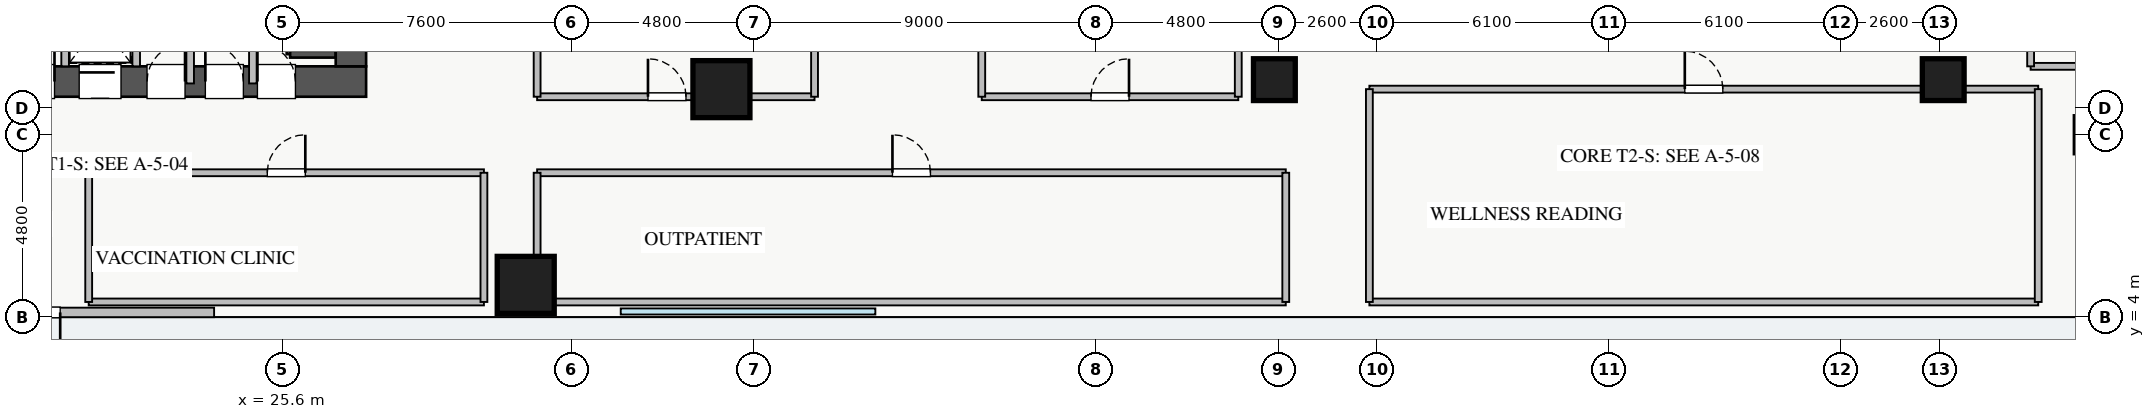
"""IFC4 building model, lengths in metres.
Left out: names, types, materials, properties, quantities, classifications, styles, units other than length and angle.
Written with IfcOpenShell. Run it as: python <this file> out.ifc"""

import sys

from ifc_helpers import new_model, si_unit, direction, frame, frame_2d, origin, origin_2d, place, context, subcontext, project, spatial, rectangle, extrude, source, transform, mapped, element, fill, save


model = new_model("IFC4")
c1 = context("Model", 3, precision=1e-05, world=origin(), true_north=direction((0.0, 1.0)))
c2 = subcontext(c1, "Body", "Model", "MODEL_VIEW")
j1 = project(units=[si_unit("LENGTHUNIT", "METRE"), si_unit("PLANEANGLEUNIT", "RADIAN")], contexts=[c1])
p1 = place(None, origin())
s1 = spatial("IfcSite", under=j1, at=p1, CompositionType="ELEMENT")
p2 = place(p1, origin())
s2 = spatial("IfcBuilding", under=s1, at=p2, CompositionType="ELEMENT")
p3 = place(p2, frame((0.0, 0.0, 9.4)))
s3 = spatial("IfcBuildingStorey", under=s2, at=p3, CompositionType="ELEMENT", Elevation=9.4)
p4 = place(p3, frame((25.8, 10.92, 0.0), z_axis=(0.0, 0.0, 1.0), x_axis=(0.0, 1.0, 0.0)))
e1 = element("IfcWall", 1, at=p4, inside=s3, PredefinedType="SHEAR", context=c2, shape_type="SweptSolid", body=[
    extrude(rectangle(XDim=1.06, YDim=0.18, at=frame_2d((0.53, 0.0))), origin(), (0.0, 0.0, 1.0), 4.18),
])
p5 = place(p3, frame((25.8, 10.92, 0.0), z_axis=(0.0, 0.0, 1.0), x_axis=(1.0, 0.0, 0.0)))
e2 = element("IfcWall", 2, at=p5, inside=s3, PredefinedType="SHEAR", context=c2, shape_type="SweptSolid", body=[
    extrude(rectangle(XDim=1.2, YDim=0.18, at=frame_2d((0.6, 0.0))), origin(), (0.0, 0.0, 1.0), 4.18),
])
p6 = place(p3, frame((10.2, 10.2, 0.0), z_axis=(0.0, 0.0, 1.0), x_axis=(1.0, 0.0, 0.0)))
e3 = element("IfcWall", 3, at=p6, inside=s3, PredefinedType="SHEAR", context=c2, shape_type="SweptSolid", body=[
    extrude(rectangle(XDim=17.6, YDim=0.8, at=frame_2d((8.8, 0.0))), origin(), (0.0, 0.0, 1.0), 4.4),
])
p7 = place(p6, frame((1.15, 0.0, 0.0)))
e4 = element("IfcOpeningElement", 4, at=p7, cuts=e3, PredefinedType="OPENING", context=c2, shape_type="SweptSolid", body=[
    extrude(rectangle(XDim=1.1, YDim=2.05, at=frame_2d((0.55, 1.025))), frame((0.0, 0.41, 0.0), z_axis=(0.0, -1.0, 0.0), x_axis=(1.0, 0.0, 0.0)), (0.0, 0.0, 1.0), 0.82),
])
p8 = place(p6, frame((8.3, 0.0, 0.0)))
e5 = element("IfcOpeningElement", 5, at=p8, cuts=e3, PredefinedType="OPENING", context=c2, shape_type="SweptSolid", body=[
    extrude(rectangle(XDim=1.1, YDim=2.05, at=frame_2d((0.55, 1.025))), frame((0.0, 0.41, 0.0), z_axis=(0.0, -1.0, 0.0), x_axis=(1.0, 0.0, 0.0)), (0.0, 0.0, 1.0), 0.82),
])
p9 = place(p6, frame((10.05, 0.0, 0.0)))
e6 = element("IfcOpeningElement", 6, at=p9, cuts=e3, PredefinedType="OPENING", context=c2, shape_type="SweptSolid", body=[
    extrude(rectangle(XDim=1.1, YDim=2.05, at=frame_2d((0.55, 1.025))), frame((0.0, 0.41, 0.0), z_axis=(0.0, -1.0, 0.0), x_axis=(1.0, 0.0, 0.0)), (0.0, 0.0, 1.0), 0.82),
])
p10 = place(p6, frame((14.74, 0.0, 0.0)))
e7 = element("IfcOpeningElement", 7, at=p10, cuts=e3, PredefinedType="OPENING", context=c2, shape_type="SweptSolid", body=[
    extrude(rectangle(XDim=1.0, YDim=2.05, at=frame_2d((0.5, 1.025))), frame((0.0, 0.41, 0.0), z_axis=(0.0, -1.0, 0.0), x_axis=(1.0, 0.0, 0.0)), (0.0, 0.0, 1.0), 0.82),
])
p11 = place(p6, frame((11.835, 0.0, 0.0)))
e8 = element("IfcOpeningElement", 8, at=p11, cuts=e3, PredefinedType="OPENING", context=c2, shape_type="SweptSolid", body=[
    extrude(rectangle(XDim=1.0, YDim=2.05, at=frame_2d((0.5, 1.025))), frame((0.0, 0.41, 0.0), z_axis=(0.0, -1.0, 0.0), x_axis=(1.0, 0.0, 0.0)), (0.0, 0.0, 1.0), 0.82),
])
p12 = place(p6, frame((13.37, 0.0, 0.0)))
e9 = element("IfcOpeningElement", 9, at=p12, cuts=e3, PredefinedType="OPENING", context=c2, shape_type="SweptSolid", body=[
    extrude(rectangle(XDim=1.0, YDim=2.05, at=frame_2d((0.5, 1.025))), frame((0.0, 0.41, 0.0), z_axis=(0.0, -1.0, 0.0), x_axis=(1.0, 0.0, 0.0)), (0.0, 0.0, 1.0), 0.82),
])
p13 = place(p3, frame((27.4, 10.6, 0.0), z_axis=(0.0, 0.0, 1.0), x_axis=(0.0, 1.0, 0.0)))
e10 = element("IfcWall", 10, at=p13, inside=s3, PredefinedType="SHEAR", context=c2, shape_type="SweptSolid", body=[
    extrude(rectangle(XDim=5.6, YDim=0.8, at=frame_2d((2.8, 0.0))), origin(), (0.0, 0.0, 1.0), 4.4),
])
p14 = place(p13, frame((2.1, 0.0, 0.0)))
e11 = element("IfcOpeningElement", 11, at=p14, cuts=e10, PredefinedType="OPENING", context=c2, shape_type="SweptSolid", body=[
    extrude(rectangle(XDim=1.3, YDim=2.05, at=frame_2d((0.65, 1.025))), frame((0.0, 0.41, 0.0), z_axis=(0.0, -1.0, 0.0), x_axis=(1.0, 0.0, 0.0)), (0.0, 0.0, 1.0), 0.82),
])
m1 = source(origin(), c2, "Body", "SweptSolid", [
    extrude(rectangle(XDim=1.5, YDim=1.5, at=origin_2d()), origin(), (0.0, 0.0, 1.0), 4.4),
])
for number, where, z_axis, x_axis in (
    (12, (32.0, 4.85, 0.0), (0.0, 0.0, 1.0), (1.0, 0.0, 0.0)),
    (13, (37.15, 10.0, 0.0), (0.0, 0.0, 1.0), (1.0, 0.0, 0.0)),
):
    element("IfcColumn", number, at=place(p3, frame(where, z_axis=z_axis, x_axis=x_axis)), inside=s3, PredefinedType="COLUMN", context=c2, shape_type="MappedRepresentation", body=[
        mapped(m1, transform((0.0, 0.0, 0.0), x_axis=(1.0, 0.0, 0.0), y_axis=(0.0, 1.0, 0.0), z_axis=(0.0, 0.0, 1.0), scale=1.0)),
    ])
m2 = source(origin(), c2, "Body", "SweptSolid", [
    extrude(rectangle(XDim=1.1, YDim=1.1, at=origin_2d()), origin(), (0.0, 0.0, 1.0), 4.4),
])
for number, where, z_axis, x_axis in (
    (14, (51.7, 10.25, 0.0), (0.0, 0.0, 1.0), (1.0, 0.0, 0.0)),
    (15, (69.3, 10.25, 0.0), (0.0, 0.0, 1.0), (1.0, 0.0, 0.0)),
):
    element("IfcColumn", number, at=place(p3, frame(where, z_axis=z_axis, x_axis=x_axis)), inside=s3, PredefinedType="COLUMN", context=c2, shape_type="MappedRepresentation", body=[
        mapped(m2, transform((0.0, 0.0, 0.0), x_axis=(1.0, 0.0, 0.0), y_axis=(0.0, 1.0, 0.0), z_axis=(0.0, 0.0, 1.0), scale=1.0)),
    ])
p15 = place(p3, frame((14.2, 4.125, 0.0), z_axis=(0.0, 0.0, 1.0), x_axis=(1.0, 0.0, 0.0)))
e16 = element("IfcWall", 16, at=p15, inside=s3, PredefinedType="STANDARD", context=c2, shape_type="SweptSolid", body=[
    extrude(rectangle(XDim=9.6, YDim=0.25, at=frame_2d((4.8, 0.0))), origin(), (0.0, 0.0, 1.0), 3.72),
])
p16 = place(p15, frame((4.05, 0.0, 0.0)))
e17 = element("IfcOpeningElement", 17, at=p16, cuts=e16, PredefinedType="OPENING", context=c2, shape_type="SweptSolid", body=[
    extrude(rectangle(XDim=1.5, YDim=2.15, at=frame_2d((0.75, 1.075))), frame((0.0, 0.135, 0.0), z_axis=(0.0, -1.0, 0.0), x_axis=(1.0, 0.0, 0.0)), (0.0, 0.0, 1.0), 0.27),
])
p17 = place(p3, frame((19.88, 10.6, 0.0), z_axis=(0.0, 0.0, 1.0), x_axis=(0.0, 1.0, 0.0)))
e18 = element("IfcWall", 18, at=p17, inside=s3, PredefinedType="PARTITIONING", context=c2, shape_type="SweptSolid", body=[
    extrude(rectangle(XDim=2.21, YDim=0.2, at=frame_2d((1.105, 0.0))), origin(), (0.0, 0.0, 1.0), 4.18),
])
p18 = place(p3, frame((24.82, 10.15, 0.0), z_axis=(0.0, 0.0, 1.0), x_axis=(0.0, 1.0, 0.0)))
e19 = element("IfcWall", 19, at=p18, inside=s3, PredefinedType="PARTITIONING", context=c2, shape_type="SweptSolid", body=[
    extrude(rectangle(XDim=2.65, YDim=0.2, at=frame_2d((1.325, 0.0))), origin(), (0.0, 0.0, 1.0), 4.18),
])
p19 = place(p3, frame((21.75, 10.6, 0.0), z_axis=(0.0, 0.0, 1.0), x_axis=(0.0, 1.0, 0.0)))
e20 = element("IfcWall", 20, at=p19, inside=s3, PredefinedType="PARTITIONING", context=c2, shape_type="SweptSolid", body=[
    extrude(rectangle(XDim=2.2, YDim=0.2, at=frame_2d((1.1, 0.0))), origin(), (0.0, 0.0, 1.0), 4.18),
])
p20 = place(p3, frame((23.17, 10.15, 0.0), z_axis=(0.0, 0.0, 1.0), x_axis=(0.0, 1.0, 0.0)))
e21 = element("IfcWall", 21, at=p20, inside=s3, PredefinedType="PARTITIONING", context=c2, shape_type="SweptSolid", body=[
    extrude(rectangle(XDim=2.65, YDim=0.2, at=frame_2d((1.325, 0.0))), origin(), (0.0, 0.0, 1.0), 4.18),
])
p21 = place(p3, frame((32.3, 9.8, 0.0), z_axis=(0.0, 0.0, 1.0), x_axis=(1.0, 0.0, 0.0)))
e22 = element("IfcWall", 22, at=p21, inside=s3, PredefinedType="PARTITIONING", context=c2, shape_type="SweptSolid", body=[
    extrude(rectangle(XDim=7.3, YDim=0.18, at=frame_2d((3.65, 0.0))), origin(), (0.0, 0.0, 1.0), 4.18),
])
p22 = place(p21, frame((2.917, 0.0, 0.0)))
e23 = element("IfcOpeningElement", 23, at=p22, cuts=e22, PredefinedType="OPENING", context=c2, shape_type="SweptSolid", body=[
    extrude(rectangle(XDim=1.0, YDim=2.05, at=frame_2d((0.5, 1.025))), frame((0.0, 0.1, 0.0), z_axis=(0.0, -1.0, 0.0), x_axis=(1.0, 0.0, 0.0)), (0.0, 0.0, 1.0), 0.2),
])
for number, where, z_axis, x_axis in (
    (24, (32.3, 9.8, 0.0), (0.0, 0.0, 1.0), (0.0, 1.0, 0.0)),
    (25, (39.6, 9.8, 0.0), (0.0, 0.0, 1.0), (0.0, 1.0, 0.0)),
):
    element("IfcWall", number, at=place(p3, frame(where, z_axis=z_axis, x_axis=x_axis)), inside=s3, PredefinedType="PARTITIONING", context=c2, shape_type="SweptSolid", body=[
        extrude(rectangle(XDim=2.8, YDim=0.18, at=frame_2d((1.4, 0.0))), origin(), (0.0, 0.0, 1.0), 4.18),
    ])
p23 = place(p3, frame((44.0, 9.8, 0.0), z_axis=(0.0, 0.0, 1.0), x_axis=(1.0, 0.0, 0.0)))
e26 = element("IfcWall", 26, at=p23, inside=s3, PredefinedType="PARTITIONING", context=c2, shape_type="SweptSolid", body=[
    extrude(rectangle(XDim=6.75, YDim=0.18, at=frame_2d((3.375, 0.0))), origin(), (0.0, 0.0, 1.0), 4.18),
])
p24 = place(p23, frame((2.875, 0.0, 0.0)))
e27 = element("IfcOpeningElement", 27, at=p24, cuts=e26, PredefinedType="OPENING", context=c2, shape_type="SweptSolid", body=[
    extrude(rectangle(XDim=1.0, YDim=2.05, at=frame_2d((0.5, 1.025))), frame((0.0, 0.1, 0.0), z_axis=(0.0, -1.0, 0.0), x_axis=(1.0, 0.0, 0.0)), (0.0, 0.0, 1.0), 0.2),
])
for number, where, z_axis, x_axis in (
    (28, (44.0, 9.8, 0.0), (0.0, 0.0, 1.0), (0.0, 1.0, 0.0)),
    (29, (50.75, 9.8, 0.0), (0.0, 0.0, 1.0), (0.0, 1.0, 0.0)),
):
    element("IfcWall", number, at=place(p3, frame(where, z_axis=z_axis, x_axis=x_axis)), inside=s3, PredefinedType="PARTITIONING", context=c2, shape_type="SweptSolid", body=[
        extrude(rectangle(XDim=12.0, YDim=0.18, at=frame_2d((6.0, 0.0))), origin(), (0.0, 0.0, 1.0), 4.18),
    ])
p25 = place(p3, frame((71.6, 10.6, 0.0), z_axis=(0.0, 0.0, 1.0), x_axis=(1.0, 0.0, 0.0)))
e30 = element("IfcWall", 30, at=p25, inside=s3, PredefinedType="PARTITIONING", context=c2, shape_type="SweptSolid", body=[
    extrude(rectangle(XDim=2.15, YDim=0.18, at=frame_2d((1.075, 0.0))), origin(), (0.0, 0.0, 1.0), 4.18),
])
p26 = place(p3, frame((71.6, 10.6, 0.0), z_axis=(0.0, 0.0, 1.0), x_axis=(0.0, 1.0, 0.0)))
e31 = element("IfcWall", 31, at=p26, inside=s3, PredefinedType="PARTITIONING", context=c2, shape_type="SweptSolid", body=[
    extrude(rectangle(XDim=24.8, YDim=0.18, at=frame_2d((12.4, 0.0))), origin(), (0.0, 0.0, 1.0), 4.18),
])
p27 = place(p26, frame((11.9, 0.0, 0.0)))
e32 = element("IfcOpeningElement", 32, at=p27, cuts=e31, PredefinedType="OPENING", context=c2, shape_type="SweptSolid", body=[
    extrude(rectangle(XDim=1.0, YDim=2.05, at=frame_2d((0.5, 1.025))), frame((0.0, 0.1, 0.0), z_axis=(0.0, -1.0, 0.0), x_axis=(1.0, 0.0, 0.0)), (0.0, 0.0, 1.0), 0.2),
])
p28 = place(p3, frame((20.5, 4.4, 0.0), z_axis=(0.0, 0.0, 1.0), x_axis=(1.0, 0.0, 0.0)))
e33 = element("IfcWall", 33, at=p28, inside=s3, PredefinedType="PARTITIONING", context=c2, shape_type="SweptSolid", body=[
    extrude(rectangle(XDim=10.4, YDim=0.18, at=frame_2d((5.2, 0.0))), origin(), (0.0, 0.0, 1.0), 4.18),
])
p29 = place(p3, frame((20.5, 7.8, 0.0), z_axis=(0.0, 0.0, 1.0), x_axis=(1.0, 0.0, 0.0)))
e34 = element("IfcWall", 34, at=p29, inside=s3, PredefinedType="PARTITIONING", context=c2, shape_type="SweptSolid", body=[
    extrude(rectangle(XDim=10.4, YDim=0.18, at=frame_2d((5.2, 0.0))), origin(), (0.0, 0.0, 1.0), 4.18),
])
p30 = place(p29, frame((4.7, 0.0, 0.0)))
e35 = element("IfcOpeningElement", 35, at=p30, cuts=e34, PredefinedType="OPENING", context=c2, shape_type="SweptSolid", body=[
    extrude(rectangle(XDim=1.0, YDim=2.05, at=frame_2d((0.5, 1.025))), frame((0.0, 0.1, 0.0), z_axis=(0.0, -1.0, 0.0), x_axis=(1.0, 0.0, 0.0)), (0.0, 0.0, 1.0), 0.2),
])
for number, where, z_axis, x_axis in (
    (36, (20.5, 4.4, 0.0), (0.0, 0.0, 1.0), (0.0, 1.0, 0.0)),
    (37, (30.9, 4.4, 0.0), (0.0, 0.0, 1.0), (0.0, 1.0, 0.0)),
):
    element("IfcWall", number, at=place(p3, frame(where, z_axis=z_axis, x_axis=x_axis)), inside=s3, PredefinedType="PARTITIONING", context=c2, shape_type="SweptSolid", body=[
        extrude(rectangle(XDim=3.4, YDim=0.18, at=frame_2d((1.7, 0.0))), origin(), (0.0, 0.0, 1.0), 4.18),
    ])
p31 = place(p3, frame((32.3, 4.4, 0.0), z_axis=(0.0, 0.0, 1.0), x_axis=(1.0, 0.0, 0.0)))
e38 = element("IfcWall", 38, at=p31, inside=s3, PredefinedType="PARTITIONING", context=c2, shape_type="SweptSolid", body=[
    extrude(rectangle(XDim=19.7, YDim=0.18, at=frame_2d((9.85, 0.0))), origin(), (0.0, 0.0, 1.0), 4.18),
])
p32 = place(p3, frame((32.3, 7.8, 0.0), z_axis=(0.0, 0.0, 1.0), x_axis=(1.0, 0.0, 0.0)))
e39 = element("IfcWall", 39, at=p32, inside=s3, PredefinedType="PARTITIONING", context=c2, shape_type="SweptSolid", body=[
    extrude(rectangle(XDim=19.7, YDim=0.18, at=frame_2d((9.85, 0.0))), origin(), (0.0, 0.0, 1.0), 4.18),
])
p33 = place(p32, frame((9.35, 0.0, 0.0)))
e40 = element("IfcOpeningElement", 40, at=p33, cuts=e39, PredefinedType="OPENING", context=c2, shape_type="SweptSolid", body=[
    extrude(rectangle(XDim=1.0, YDim=2.05, at=frame_2d((0.5, 1.025))), frame((0.0, 0.1, 0.0), z_axis=(0.0, -1.0, 0.0), x_axis=(1.0, 0.0, 0.0)), (0.0, 0.0, 1.0), 0.2),
])
for number, where, z_axis, x_axis in (
    (41, (32.3, 4.4, 0.0), (0.0, 0.0, 1.0), (0.0, 1.0, 0.0)),
    (42, (52.0, 4.4, 0.0), (0.0, 0.0, 1.0), (0.0, 1.0, 0.0)),
):
    element("IfcWall", number, at=place(p3, frame(where, z_axis=z_axis, x_axis=x_axis)), inside=s3, PredefinedType="PARTITIONING", context=c2, shape_type="SweptSolid", body=[
        extrude(rectangle(XDim=3.4, YDim=0.18, at=frame_2d((1.7, 0.0))), origin(), (0.0, 0.0, 1.0), 4.18),
    ])
p34 = place(p3, frame((54.2, 4.4, 0.0), z_axis=(0.0, 0.0, 1.0), x_axis=(1.0, 0.0, 0.0)))
e43 = element("IfcWall", 43, at=p34, inside=s3, PredefinedType="PARTITIONING", context=c2, shape_type="SweptSolid", body=[
    extrude(rectangle(XDim=17.6, YDim=0.18, at=frame_2d((8.8, 0.0))), origin(), (0.0, 0.0, 1.0), 4.18),
])
p35 = place(p3, frame((54.2, 10.0, 0.0), z_axis=(0.0, 0.0, 1.0), x_axis=(1.0, 0.0, 0.0)))
e44 = element("IfcWall", 44, at=p35, inside=s3, PredefinedType="PARTITIONING", context=c2, shape_type="SweptSolid", body=[
    extrude(rectangle(XDim=17.6, YDim=0.18, at=frame_2d((8.8, 0.0))), origin(), (0.0, 0.0, 1.0), 3.675),
])
p36 = place(p35, frame((8.3, 0.0, 0.0)))
e45 = element("IfcOpeningElement", 45, at=p36, cuts=e44, PredefinedType="OPENING", context=c2, shape_type="SweptSolid", body=[
    extrude(rectangle(XDim=1.0, YDim=2.05, at=frame_2d((0.5, 1.025))), frame((0.0, 0.1, 0.0), z_axis=(0.0, -1.0, 0.0), x_axis=(1.0, 0.0, 0.0)), (0.0, 0.0, 1.0), 0.2),
])
for number, where, z_axis, x_axis in (
    (46, (54.2, 4.4, 0.0), (0.0, 0.0, 1.0), (0.0, 1.0, 0.0)),
    (47, (71.8, 4.4, 0.0), (0.0, 0.0, 1.0), (0.0, 1.0, 0.0)),
):
    element("IfcWall", number, at=place(p3, frame(where, z_axis=z_axis, x_axis=x_axis)), inside=s3, PredefinedType="PARTITIONING", context=c2, shape_type="SweptSolid", body=[
        extrude(rectangle(XDim=5.6, YDim=0.18, at=frame_2d((2.8, 0.0))), origin(), (0.0, 0.0, 1.0), 4.18),
    ])
m3 = source(origin(), c2, "Body", "SweptSolid", [
    extrude(rectangle(XDim=1.5, YDim=2.15, at=frame_2d((0.75, 1.075))), frame((0.0, 0.025, 0.0), z_axis=(0.0, -1.0, 0.0), x_axis=(1.0, 0.0, 0.0)), (0.0, 0.0, 1.0), 0.05),
])
p37 = place(p16, frame((1.5, 0.0, 0.0), z_axis=(0.0, 0.0, 1.0), x_axis=(-1.0, 0.0, 0.0)))
e48 = element("IfcDoor", 48, at=p37, inside=s3, OperationType="DOUBLE_DOOR_SINGLE_SWING", PredefinedType="DOOR", context=c2, shape_type="MappedRepresentation", body=[
    mapped(m3, transform((0.0, 0.0, 0.0), x_axis=(1.0, 0.0, 0.0), y_axis=(0.0, 1.0, 0.0), z_axis=(0.0, 0.0, 1.0), scale=1.0)),
])
fill(e17, e48)
m4 = source(origin(), c2, "Body", "SweptSolid", [
    extrude(rectangle(XDim=1.1, YDim=2.05, at=frame_2d((0.55, 1.025))), frame((0.0, 0.025, 0.0), z_axis=(0.0, -1.0, 0.0), x_axis=(1.0, 0.0, 0.0)), (0.0, 0.0, 1.0), 0.05),
])
p38 = place(p8, origin())
e49 = element("IfcDoor", 49, at=p38, inside=s3, OperationType="SINGLE_SWING_RIGHT", PredefinedType="DOOR", context=c2, shape_type="MappedRepresentation", body=[
    mapped(m4, transform((0.0, 0.0, 0.0), x_axis=(1.0, 0.0, 0.0), y_axis=(0.0, 1.0, 0.0), z_axis=(0.0, 0.0, 1.0), scale=1.0)),
])
fill(e5, e49)
p39 = place(p9, origin())
e50 = element("IfcDoor", 50, at=p39, inside=s3, OperationType="SLIDING_TO_RIGHT", PredefinedType="DOOR", context=c2, shape_type="MappedRepresentation", body=[
    mapped(m4, transform((0.0, 0.0, 0.0), x_axis=(1.0, 0.0, 0.0), y_axis=(0.0, 1.0, 0.0), z_axis=(0.0, 0.0, 1.0), scale=1.0)),
])
fill(e6, e50)
m5 = source(origin(), c2, "Body", "SweptSolid", [
    extrude(rectangle(XDim=1.0, YDim=2.05, at=frame_2d((0.5, 1.025))), frame((0.0, 0.025, 0.0), z_axis=(0.0, -1.0, 0.0), x_axis=(1.0, 0.0, 0.0)), (0.0, 0.0, 1.0), 0.05),
])
p40 = place(p10, origin())
e51 = element("IfcDoor", 51, at=p40, inside=s3, OperationType="SINGLE_SWING_LEFT", PredefinedType="DOOR", context=c2, shape_type="MappedRepresentation", body=[
    mapped(m5, transform((0.0, 0.0, 0.0), x_axis=(1.0, 0.0, 0.0), y_axis=(0.0, 1.0, 0.0), z_axis=(0.0, 0.0, 1.0), scale=1.0)),
])
fill(e7, e51)
p41 = place(p11, origin())
e52 = element("IfcDoor", 52, at=p41, inside=s3, OperationType="SINGLE_SWING_RIGHT", PredefinedType="DOOR", context=c2, shape_type="MappedRepresentation", body=[
    mapped(m5, transform((0.0, 0.0, 0.0), x_axis=(1.0, 0.0, 0.0), y_axis=(0.0, 1.0, 0.0), z_axis=(0.0, 0.0, 1.0), scale=1.0)),
])
fill(e8, e52)
p42 = place(p12, origin())
e53 = element("IfcDoor", 53, at=p42, inside=s3, OperationType="SINGLE_SWING_LEFT", PredefinedType="DOOR", context=c2, shape_type="MappedRepresentation", body=[
    mapped(m5, transform((0.0, 0.0, 0.0), x_axis=(1.0, 0.0, 0.0), y_axis=(0.0, 1.0, 0.0), z_axis=(0.0, 0.0, 1.0), scale=1.0)),
])
fill(e9, e53)
p43 = place(p22, origin())
e54 = element("IfcDoor", 54, at=p43, inside=s3, OperationType="SINGLE_SWING_LEFT", PredefinedType="DOOR", context=c2, shape_type="MappedRepresentation", body=[
    mapped(m5, transform((0.0, 0.0, 0.0), x_axis=(1.0, 0.0, 0.0), y_axis=(0.0, 1.0, 0.0), z_axis=(0.0, 0.0, 1.0), scale=1.0)),
])
fill(e23, e54)
p44 = place(p24, origin())
e55 = element("IfcDoor", 55, at=p44, inside=s3, OperationType="SINGLE_SWING_RIGHT", PredefinedType="DOOR", context=c2, shape_type="MappedRepresentation", body=[
    mapped(m5, transform((0.0, 0.0, 0.0), x_axis=(1.0, 0.0, 0.0), y_axis=(0.0, 1.0, 0.0), z_axis=(0.0, 0.0, 1.0), scale=1.0)),
])
fill(e27, e55)
p45 = place(p30, origin())
e56 = element("IfcDoor", 56, at=p45, inside=s3, OperationType="SINGLE_SWING_RIGHT", PredefinedType="DOOR", context=c2, shape_type="MappedRepresentation", body=[
    mapped(m5, transform((0.0, 0.0, 0.0), x_axis=(1.0, 0.0, 0.0), y_axis=(0.0, 1.0, 0.0), z_axis=(0.0, 0.0, 1.0), scale=1.0)),
])
fill(e35, e56)
p46 = place(p33, origin())
e57 = element("IfcDoor", 57, at=p46, inside=s3, OperationType="SINGLE_SWING_LEFT", PredefinedType="DOOR", context=c2, shape_type="MappedRepresentation", body=[
    mapped(m5, transform((0.0, 0.0, 0.0), x_axis=(1.0, 0.0, 0.0), y_axis=(0.0, 1.0, 0.0), z_axis=(0.0, 0.0, 1.0), scale=1.0)),
])
fill(e40, e57)
p47 = place(p36, origin())
e58 = element("IfcDoor", 58, at=p47, inside=s3, OperationType="SINGLE_SWING_LEFT", PredefinedType="DOOR", context=c2, shape_type="MappedRepresentation", body=[
    mapped(m5, transform((0.0, 0.0, 0.0), x_axis=(1.0, 0.0, 0.0), y_axis=(0.0, 1.0, 0.0), z_axis=(0.0, 0.0, 1.0), scale=1.0)),
])
fill(e45, e58)
save(model, sys.argv[1])
